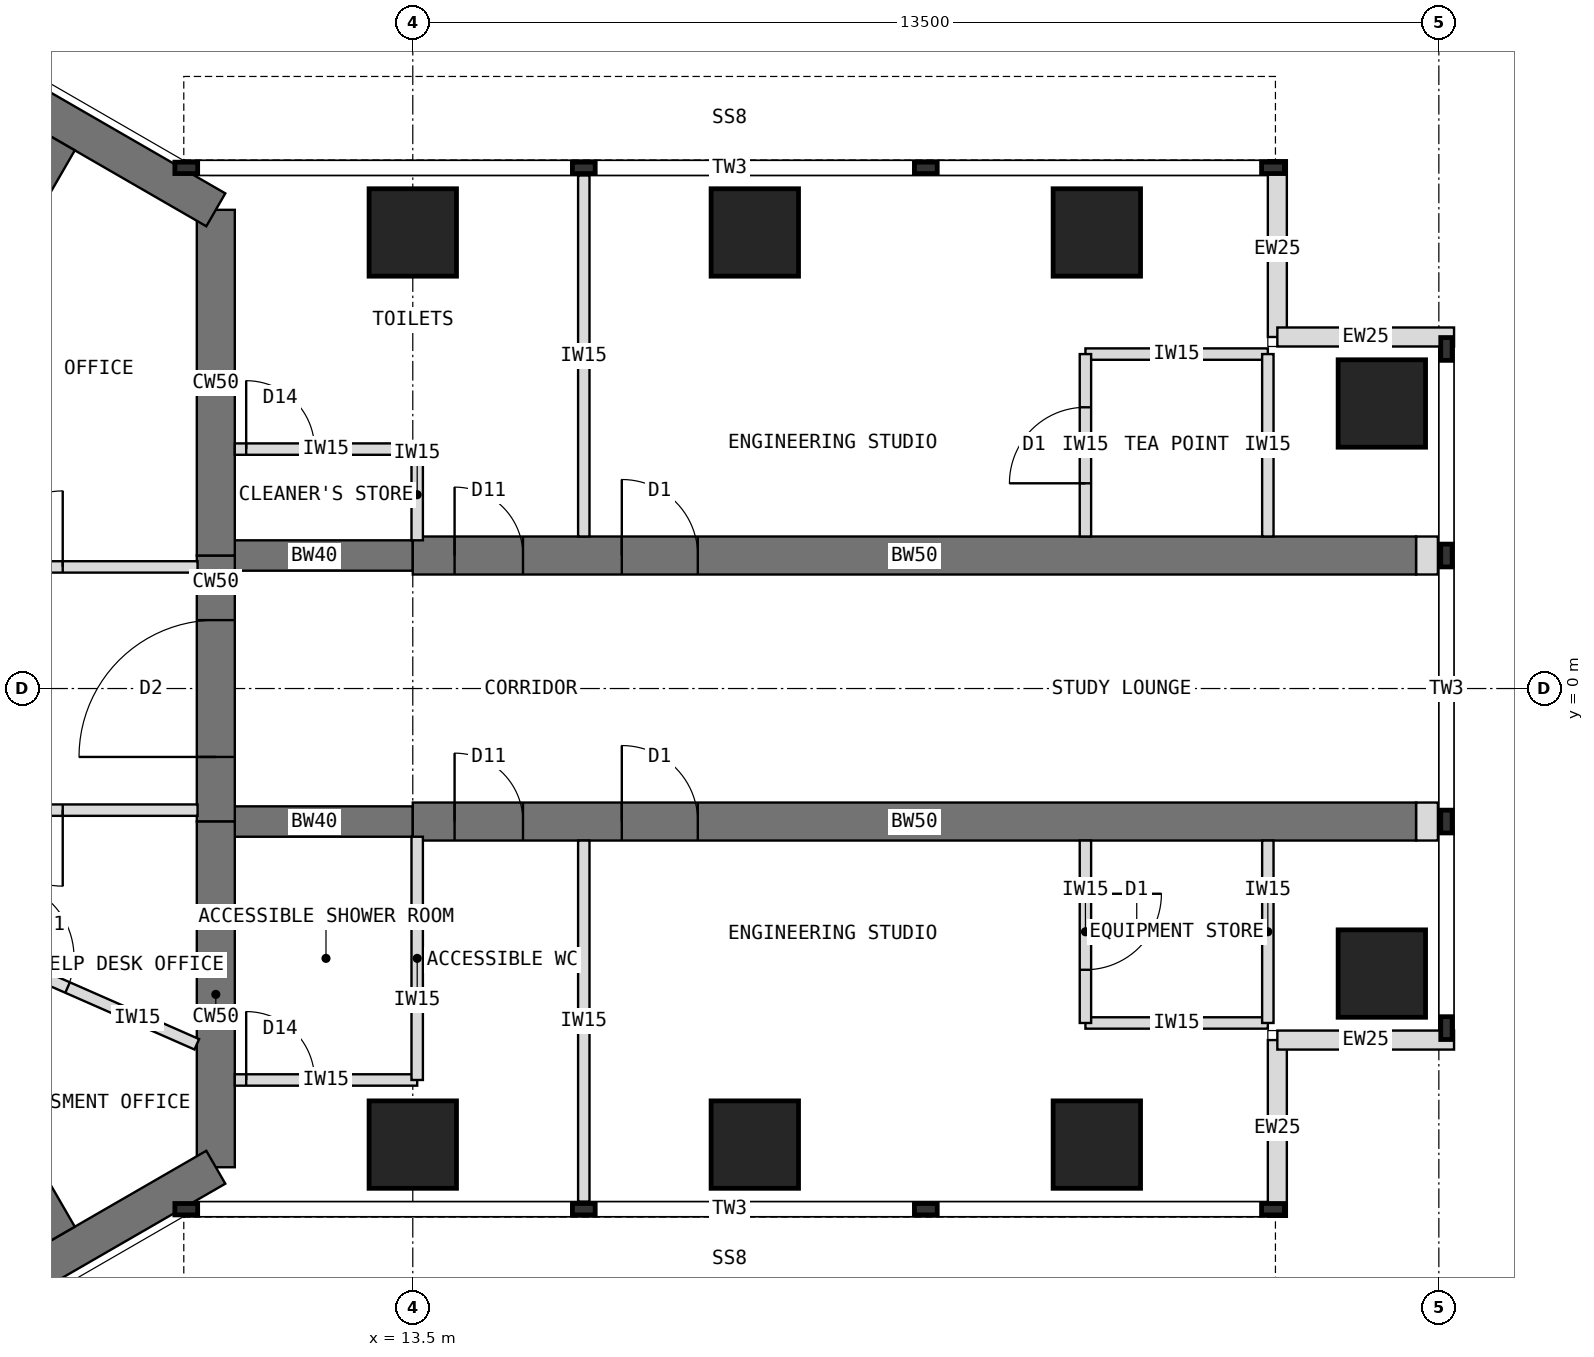
"""IFC4 building model, lengths in metres.
Left out: names, types, materials, properties, quantities, classifications, styles, units other than length and angle.
Written with IfcOpenShell. Run it as: python <this file> out.ifc"""

import sys

from ifc_helpers import new_model, si_unit, direction, frame, frame_2d, origin, origin_2d, place, context, subcontext, project, spatial, rectangle, extrude, element, fill, save


model = new_model("IFC4")
c1 = context("Model", 3, precision=1e-05, world=origin(), true_north=direction((0.0, 1.0)))
c2 = subcontext(c1, "Body", "Model", "MODEL_VIEW")
j1 = project(units=[si_unit("LENGTHUNIT", "METRE"), si_unit("PLANEANGLEUNIT", "RADIAN")], contexts=[c1])
p1 = place(None, origin())
s1 = spatial("IfcSite", under=j1, at=p1, CompositionType="ELEMENT")
p2 = place(p1, origin())
s2 = spatial("IfcBuilding", under=s1, at=p2, CompositionType="ELEMENT")
p3 = place(p2, frame((0.0, 0.0, 194.5)))
s3 = spatial("IfcBuildingStorey", under=s2, at=p3, CompositionType="ELEMENT", Elevation=194.5)
p4 = place(p3, frame((10.908, -6.298, 0.0), z_axis=(0.0, 0.0, 1.0), x_axis=(0.0, 1.0, 0.0)))
e1 = element("IfcWall", 1, at=p4, inside=s3, PredefinedType="SHEAR", context=c2, shape_type="SweptSolid", body=[
    extrude(rectangle(XDim=4.548, YDim=0.5, at=frame_2d((2.274, 0.0))), origin(), (0.0, 0.0, 1.0), 4.0),
])
p5 = place(p3, frame((10.908, -1.75, 0.0), z_axis=(0.0, 0.0, 1.0), x_axis=(0.0, 1.0, 0.0)))
e2 = element("IfcWall", 2, at=p5, inside=s3, PredefinedType="SHEAR", context=c2, shape_type="SweptSolid", body=[
    extrude(rectangle(XDim=3.5, YDim=0.5, at=frame_2d((1.75, 0.0))), origin(), (0.0, 0.0, 1.0), 4.0),
])
p6 = place(p5, frame((0.85, 0.0, 0.0)))
e3 = element("IfcOpeningElement", 3, at=p6, cuts=e2, PredefinedType="OPENING", context=c2, shape_type="SweptSolid", body=[
    extrude(rectangle(XDim=1.8, YDim=2.1, at=frame_2d((0.9, 1.05))), frame((0.0, 0.26, 0.0), z_axis=(0.0, -1.0, 0.0), x_axis=(1.0, 0.0, 0.0)), (0.0, 0.0, 1.0), 0.52),
])
p7 = place(p3, frame((10.908, 1.75, 0.0), z_axis=(0.0, 0.0, 1.0), x_axis=(0.0, 1.0, 0.0)))
e4 = element("IfcWall", 4, at=p7, inside=s3, PredefinedType="SHEAR", context=c2, shape_type="SweptSolid", body=[
    extrude(rectangle(XDim=4.548, YDim=0.5, at=frame_2d((2.274, 0.0))), origin(), (0.0, 0.0, 1.0), 4.0),
])
for number, where, z_axis, x_axis in (
    (5, (10.908, 6.298, 0.0), (0.0, 0.0, 1.0), (-0.866, 0.5, 0.0)),
    (6, (0.0, -12.596, 0.0), (0.0, 0.0, 1.0), (0.866, 0.5, 0.0)),
):
    element("IfcWall", number, at=place(p3, frame(where, z_axis=z_axis, x_axis=x_axis)), inside=s3, PredefinedType="SHEAR", context=c2, shape_type="SweptSolid", body=[
        extrude(rectangle(XDim=12.596, YDim=0.5, at=frame_2d((6.298, 0.0))), origin(), (0.0, 0.0, 1.0), 4.0),
    ])
p8 = place(p3, frame((10.908, 1.75, 0.0), z_axis=(0.0, 0.0, 1.0), x_axis=(1.0, 0.0, 0.0)))
e7 = element("IfcWall", 7, at=p8, inside=s3, PredefinedType="SHEAR", context=c2, shape_type="SweptSolid", body=[
    extrude(rectangle(XDim=2.592, YDim=0.4, at=frame_2d((1.296, 0.0))), origin(), (0.0, 0.0, 1.0), 4.0),
])
p9 = place(p3, frame((13.5, 1.75, 0.0), z_axis=(0.0, 0.0, 1.0), x_axis=(1.0, 0.0, 0.0)))
e8 = element("IfcWall", 8, at=p9, inside=s3, PredefinedType="SHEAR", context=c2, shape_type="SweptSolid", body=[
    extrude(rectangle(XDim=13.2, YDim=0.5, at=frame_2d((6.6, 0.0))), origin(), (0.0, 0.0, 1.0), 4.0),
])
p10 = place(p9, frame((0.55, 0.0, 0.0)))
e9 = element("IfcOpeningElement", 9, at=p10, cuts=e8, PredefinedType="OPENING", context=c2, shape_type="SweptSolid", body=[
    extrude(rectangle(XDim=0.9, YDim=2.1, at=frame_2d((0.45, 1.05))), frame((0.0, 0.26, 0.0), z_axis=(0.0, -1.0, 0.0), x_axis=(1.0, 0.0, 0.0)), (0.0, 0.0, 1.0), 0.52),
])
p11 = place(p9, frame((2.75, 0.0, 0.0)))
e10 = element("IfcOpeningElement", 10, at=p11, cuts=e8, PredefinedType="OPENING", context=c2, shape_type="SweptSolid", body=[
    extrude(rectangle(XDim=1.0, YDim=2.1, at=frame_2d((0.5, 1.05))), frame((0.0, 0.26, 0.0), z_axis=(0.0, -1.0, 0.0), x_axis=(1.0, 0.0, 0.0)), (0.0, 0.0, 1.0), 0.52),
])
p12 = place(p3, frame((10.908, -1.75, 0.0), z_axis=(0.0, 0.0, 1.0), x_axis=(1.0, 0.0, 0.0)))
e11 = element("IfcWall", 11, at=p12, inside=s3, PredefinedType="SHEAR", context=c2, shape_type="SweptSolid", body=[
    extrude(rectangle(XDim=2.592, YDim=0.4, at=frame_2d((1.296, 0.0))), origin(), (0.0, 0.0, 1.0), 4.0),
])
p13 = place(p3, frame((13.5, -1.75, 0.0), z_axis=(0.0, 0.0, 1.0), x_axis=(1.0, 0.0, 0.0)))
e12 = element("IfcWall", 12, at=p13, inside=s3, PredefinedType="SHEAR", context=c2, shape_type="SweptSolid", body=[
    extrude(rectangle(XDim=13.2, YDim=0.5, at=frame_2d((6.6, 0.0))), origin(), (0.0, 0.0, 1.0), 4.0),
])
p14 = place(p13, frame((0.55, 0.0, 0.0)))
e13 = element("IfcOpeningElement", 13, at=p14, cuts=e12, PredefinedType="OPENING", context=c2, shape_type="SweptSolid", body=[
    extrude(rectangle(XDim=0.9, YDim=2.1, at=frame_2d((0.45, 1.05))), frame((0.0, 0.26, 0.0), z_axis=(0.0, -1.0, 0.0), x_axis=(1.0, 0.0, 0.0)), (0.0, 0.0, 1.0), 0.52),
])
p15 = place(p13, frame((2.75, 0.0, 0.0)))
e14 = element("IfcOpeningElement", 14, at=p15, cuts=e12, PredefinedType="OPENING", context=c2, shape_type="SweptSolid", body=[
    extrude(rectangle(XDim=1.0, YDim=2.1, at=frame_2d((0.5, 1.05))), frame((0.0, 0.26, 0.0), z_axis=(0.0, -1.0, 0.0), x_axis=(1.0, 0.0, 0.0)), (0.0, 0.0, 1.0), 0.52),
])
for number, where, z_axis, x_axis in (
    (15, (13.5, 6.0, 0.0), (0.0, 0.0, 1.0), (1.0, 0.0, 0.0)),
    (16, (13.5, -6.0, 0.0), (0.0, 0.0, 1.0), (1.0, 0.0, 0.0)),
    (17, (18.0, 6.0, 0.0), (0.0, 0.0, 1.0), (1.0, 0.0, 0.0)),
    (18, (18.0, -6.0, 0.0), (0.0, 0.0, 1.0), (1.0, 0.0, 0.0)),
    (19, (22.5, 6.0, 0.0), (0.0, 0.0, 1.0), (1.0, 0.0, 0.0)),
    (20, (22.5, -6.0, 0.0), (0.0, 0.0, 1.0), (1.0, 0.0, 0.0)),
    (21, (26.25, 3.75, 0.0), (0.0, 0.0, 1.0), (1.0, 0.0, 0.0)),
    (22, (26.25, -3.75, 0.0), (0.0, 0.0, 1.0), (1.0, 0.0, 0.0)),
):
    element("IfcColumn", number, at=place(p3, frame(where, z_axis=z_axis, x_axis=x_axis)), inside=s3, PredefinedType="COLUMN", context=c2, shape_type="SweptSolid", body=[
        extrude(rectangle(XDim=1.15, YDim=1.15, at=origin_2d()), origin(), (0.0, 0.0, 1.0), 4.0),
    ])
for number, where, z_axis, x_axis in (
    (23, (24.875, 6.95, 0.0), (0.0, 0.0, 1.0), (0.0, -1.0, 0.0)),
    (24, (24.875, 4.625, 0.0), (0.0, 0.0, 1.0), (1.0, 0.0, 0.0)),
    (25, (24.875, -6.95, 0.0), (0.0, 0.0, 1.0), (0.0, 1.0, 0.0)),
    (26, (24.875, -4.625, 0.0), (0.0, 0.0, 1.0), (1.0, 0.0, 0.0)),
):
    element("IfcWall", number, at=place(p3, frame(where, z_axis=z_axis, x_axis=x_axis)), inside=s3, PredefinedType="STANDARD", context=c2, shape_type="SweptSolid", body=[
        extrude(rectangle(XDim=2.325, YDim=0.25, at=frame_2d((1.163, 0.0))), origin(), (0.0, 0.0, 1.0), 3.8),
    ])
for number, where, z_axis, x_axis in (
    (27, (26.7, 1.75, 0.0), (0.0, 0.0, 1.0), (1.0, 0.0, 0.0)),
    (28, (26.7, -1.75, 0.0), (0.0, 0.0, 1.0), (1.0, 0.0, 0.0)),
):
    element("IfcWall", number, at=place(p3, frame(where, z_axis=z_axis, x_axis=x_axis)), inside=s3, PredefinedType="PARTITIONING", context=c2, shape_type="SweptSolid", body=[
        extrude(rectangle(XDim=0.288, YDim=0.5, at=frame_2d((0.144, 0.0))), origin(), (0.0, 0.0, 1.0), 3.8),
    ])
for number, where, z_axis, x_axis in (
    (29, (5.901, 2.02, 0.0), (0.0, 0.0, 1.0), (0.5, 0.866, 0.0)),
    (30, (5.901, -2.02, 0.0), (0.0, 0.0, 1.0), (0.5, -0.866, 0.0)),
):
    element("IfcWall", number, at=place(p3, frame(where, z_axis=z_axis, x_axis=x_axis)), inside=s3, PredefinedType="SHEAR", context=c2, shape_type="SweptSolid", body=[
        extrude(rectangle(XDim=5.958, YDim=0.4, at=frame_2d((2.979, 0.0))), origin(), (0.0, 0.0, 1.0), 4.0),
    ])
p16 = place(p3, frame((15.75, 2.0, 0.0), z_axis=(0.0, 0.0, 1.0), x_axis=(0.0, 1.0, 0.0)))
e31 = element("IfcWall", 31, at=p16, inside=s3, PredefinedType="PARTITIONING", context=c2, shape_type="SweptSolid", body=[
    extrude(rectangle(XDim=4.75, YDim=0.15, at=frame_2d((2.375, 0.0))), origin(), (0.0, 0.0, 1.0), 3.8),
])
p17 = place(p3, frame((22.35, 4.4, 0.0), z_axis=(0.0, 0.0, 1.0), x_axis=(1.0, 0.0, 0.0)))
e32 = element("IfcWall", 32, at=p17, inside=s3, PredefinedType="PARTITIONING", context=c2, shape_type="SweptSolid", body=[
    extrude(rectangle(XDim=2.4, YDim=0.15, at=frame_2d((1.2, 0.0))), origin(), (0.0, 0.0, 1.0), 3.8),
])
p18 = place(p3, frame((22.35, 2.0, 0.0), z_axis=(0.0, 0.0, 1.0), x_axis=(0.0, 1.0, 0.0)))
e33 = element("IfcWall", 33, at=p18, inside=s3, PredefinedType="PARTITIONING", context=c2, shape_type="SweptSolid", body=[
    extrude(rectangle(XDim=2.4, YDim=0.15, at=frame_2d((1.2, 0.0))), origin(), (0.0, 0.0, 1.0), 3.8),
])
p19 = place(p18, frame((0.7, 0.0, 0.0)))
e34 = element("IfcOpeningElement", 34, at=p19, cuts=e33, PredefinedType="OPENING", context=c2, shape_type="SweptSolid", body=[
    extrude(rectangle(XDim=1.0, YDim=2.1, at=frame_2d((0.5, 1.05))), frame((0.0, 0.085, 0.0), z_axis=(0.0, -1.0, 0.0), x_axis=(1.0, 0.0, 0.0)), (0.0, 0.0, 1.0), 0.17),
])
p20 = place(p3, frame((24.75, 2.0, 0.0), z_axis=(0.0, 0.0, 1.0), x_axis=(0.0, 1.0, 0.0)))
e35 = element("IfcWall", 35, at=p20, inside=s3, PredefinedType="PARTITIONING", context=c2, shape_type="SweptSolid", body=[
    extrude(rectangle(XDim=2.4, YDim=0.15, at=frame_2d((1.2, 0.0))), origin(), (0.0, 0.0, 1.0), 3.8),
])
p21 = place(p3, frame((11.158, 3.15, 0.0), z_axis=(0.0, 0.0, 1.0), x_axis=(1.0, 0.0, 0.0)))
e36 = element("IfcWall", 36, at=p21, inside=s3, PredefinedType="PARTITIONING", context=c2, shape_type="SweptSolid", body=[
    extrude(rectangle(XDim=2.4, YDim=0.15, at=frame_2d((1.2, 0.0))), origin(), (0.0, 0.0, 1.0), 3.8),
])
p22 = place(p21, frame((0.15, 0.0, 0.0)))
e37 = element("IfcOpeningElement", 37, at=p22, cuts=e36, PredefinedType="OPENING", context=c2, shape_type="SweptSolid", body=[
    extrude(rectangle(XDim=0.9, YDim=2.1, at=frame_2d((0.45, 1.05))), frame((0.0, 0.085, 0.0), z_axis=(0.0, -1.0, 0.0), x_axis=(1.0, 0.0, 0.0)), (0.0, 0.0, 1.0), 0.17),
])
p23 = place(p3, frame((13.558, 1.95, 0.0), z_axis=(0.0, 0.0, 1.0), x_axis=(0.0, 1.0, 0.0)))
e38 = element("IfcWall", 38, at=p23, inside=s3, PredefinedType="PARTITIONING", context=c2, shape_type="SweptSolid", body=[
    extrude(rectangle(XDim=1.2, YDim=0.15, at=frame_2d((0.6, 0.0))), origin(), (0.0, 0.0, 1.0), 3.267),
])
p24 = place(p3, frame((15.75, -2.0, 0.0), z_axis=(0.0, 0.0, 1.0), x_axis=(0.0, -1.0, 0.0)))
e39 = element("IfcWall", 39, at=p24, inside=s3, PredefinedType="PARTITIONING", context=c2, shape_type="SweptSolid", body=[
    extrude(rectangle(XDim=4.75, YDim=0.15, at=frame_2d((2.375, 0.0))), origin(), (0.0, 0.0, 1.0), 3.8),
])
p25 = place(p3, frame((22.35, -4.4, 0.0), z_axis=(0.0, 0.0, 1.0), x_axis=(1.0, 0.0, 0.0)))
e40 = element("IfcWall", 40, at=p25, inside=s3, PredefinedType="PARTITIONING", context=c2, shape_type="SweptSolid", body=[
    extrude(rectangle(XDim=2.4, YDim=0.15, at=frame_2d((1.2, 0.0))), origin(), (0.0, 0.0, 1.0), 3.8),
])
p26 = place(p3, frame((22.35, -2.0, 0.0), z_axis=(0.0, 0.0, 1.0), x_axis=(0.0, -1.0, 0.0)))
e41 = element("IfcWall", 41, at=p26, inside=s3, PredefinedType="PARTITIONING", context=c2, shape_type="SweptSolid", body=[
    extrude(rectangle(XDim=2.4, YDim=0.15, at=frame_2d((1.2, 0.0))), origin(), (0.0, 0.0, 1.0), 3.8),
])
p27 = place(p26, frame((0.7, 0.0, 0.0)))
e42 = element("IfcOpeningElement", 42, at=p27, cuts=e41, PredefinedType="OPENING", context=c2, shape_type="SweptSolid", body=[
    extrude(rectangle(XDim=1.0, YDim=2.1, at=frame_2d((0.5, 1.05))), frame((0.0, 0.085, 0.0), z_axis=(0.0, -1.0, 0.0), x_axis=(1.0, 0.0, 0.0)), (0.0, 0.0, 1.0), 0.17),
])
p28 = place(p3, frame((24.75, -2.0, 0.0), z_axis=(0.0, 0.0, 1.0), x_axis=(0.0, -1.0, 0.0)))
e43 = element("IfcWall", 43, at=p28, inside=s3, PredefinedType="PARTITIONING", context=c2, shape_type="SweptSolid", body=[
    extrude(rectangle(XDim=2.4, YDim=0.15, at=frame_2d((1.2, 0.0))), origin(), (0.0, 0.0, 1.0), 3.8),
])
p29 = place(p3, frame((11.158, -5.15, 0.0), z_axis=(0.0, 0.0, 1.0), x_axis=(1.0, 0.0, 0.0)))
e44 = element("IfcWall", 44, at=p29, inside=s3, PredefinedType="PARTITIONING", context=c2, shape_type="SweptSolid", body=[
    extrude(rectangle(XDim=2.4, YDim=0.15, at=frame_2d((1.2, 0.0))), origin(), (0.0, 0.0, 1.0), 3.8),
])
p30 = place(p29, frame((0.15, 0.0, 0.0)))
e45 = element("IfcOpeningElement", 45, at=p30, cuts=e44, PredefinedType="OPENING", context=c2, shape_type="SweptSolid", body=[
    extrude(rectangle(XDim=0.9, YDim=2.1, at=frame_2d((0.45, 1.05))), frame((0.0, 0.085, 0.0), z_axis=(0.0, -1.0, 0.0), x_axis=(1.0, 0.0, 0.0)), (0.0, 0.0, 1.0), 0.17),
])
p31 = place(p3, frame((13.558, -1.95, 0.0), z_axis=(0.0, 0.0, 1.0), x_axis=(0.0, -1.0, 0.0)))
e46 = element("IfcWall", 46, at=p31, inside=s3, PredefinedType="PARTITIONING", context=c2, shape_type="SweptSolid", body=[
    extrude(rectangle(XDim=3.2, YDim=0.15, at=frame_2d((1.6, 0.0))), origin(), (0.0, 0.0, 1.0), 3.267),
])
p32 = place(p3, frame((6.1, 1.6, 0.0), z_axis=(0.0, 0.0, 1.0), x_axis=(1.0, 0.0, 0.0)))
e47 = element("IfcWall", 47, at=p32, inside=s3, PredefinedType="PARTITIONING", context=c2, shape_type="SweptSolid", body=[
    extrude(rectangle(XDim=4.568, YDim=0.15, at=frame_2d((2.284, 0.0))), origin(), (0.0, 0.0, 1.0), 3.8),
])
p33 = place(p32, frame((1.794, 0.0, 0.0)))
e48 = element("IfcOpeningElement", 48, at=p33, cuts=e47, PredefinedType="OPENING", context=c2, shape_type="SweptSolid", body=[
    extrude(rectangle(XDim=1.0, YDim=2.1, at=frame_2d((0.5, 1.05))), frame((0.0, 0.085, 0.0), z_axis=(0.0, -1.0, 0.0), x_axis=(1.0, 0.0, 0.0)), (0.0, 0.0, 1.0), 0.17),
])
p34 = place(p3, frame((10.668, -1.6, 0.0), z_axis=(0.0, 0.0, 1.0), x_axis=(-1.0, 0.0, 0.0)))
e49 = element("IfcWall", 49, at=p34, inside=s3, PredefinedType="PARTITIONING", context=c2, shape_type="SweptSolid", body=[
    extrude(rectangle(XDim=4.568, YDim=0.15, at=frame_2d((2.284, 0.0))), origin(), (0.0, 0.0, 1.0), 3.8),
])
p35 = place(p34, frame((1.774, 0.0, 0.0)))
e50 = element("IfcOpeningElement", 50, at=p35, cuts=e49, PredefinedType="OPENING", context=c2, shape_type="SweptSolid", body=[
    extrude(rectangle(XDim=1.0, YDim=2.1, at=frame_2d((0.5, 1.05))), frame((0.0, 0.085, 0.0), z_axis=(0.0, -1.0, 0.0), x_axis=(1.0, 0.0, 0.0)), (0.0, 0.0, 1.0), 0.17),
])
p36 = place(p3, frame((6.342, -2.785, 0.0), z_axis=(0.0, 0.0, 1.0), x_axis=(0.915607292951, -0.402073730919, 0.0)))
e51 = element("IfcWall", 51, at=p36, inside=s3, PredefinedType="PARTITIONING", context=c2, shape_type="SweptSolid", body=[
    extrude(rectangle(XDim=4.714, YDim=0.15, at=frame_2d((2.357, 0.0))), origin(), (0.0, 0.0, 1.0), 3.8),
])
p37 = place(p36, frame((1.857, 0.0, 0.0)))
e52 = element("IfcOpeningElement", 52, at=p37, cuts=e51, PredefinedType="OPENING", context=c2, shape_type="SweptSolid", body=[
    extrude(rectangle(XDim=1.0, YDim=2.1, at=frame_2d((0.5, 1.05))), frame((0.0, 0.085, 0.0), z_axis=(0.0, -1.0, 0.0), x_axis=(1.0, 0.0, 0.0)), (0.0, 0.0, 1.0), 0.17),
])
p38 = place(p6, origin())
e53 = element("IfcDoor", 53, at=p38, inside=s3, OperationType="DOUBLE_DOOR_DOUBLE_SWING", PredefinedType="DOOR", context=c2, shape_type="SweptSolid", body=[
    extrude(rectangle(XDim=1.8, YDim=2.1, at=frame_2d((0.9, 1.05))), frame((0.0, 0.025, 0.0), z_axis=(0.0, -1.0, 0.0), x_axis=(1.0, 0.0, 0.0)), (0.0, 0.0, 1.0), 0.05),
])
fill(e3, e53)
p39 = place(p19, origin())
e54 = element("IfcDoor", 54, at=p39, inside=s3, OperationType="SINGLE_SWING_LEFT", PredefinedType="DOOR", context=c2, shape_type="SweptSolid", body=[
    extrude(rectangle(XDim=1.0, YDim=2.1, at=frame_2d((0.5, 1.05))), frame((0.0, 0.025, 0.0), z_axis=(0.0, -1.0, 0.0), x_axis=(1.0, 0.0, 0.0)), (0.0, 0.0, 1.0), 0.05),
])
fill(e34, e54)
p40 = place(p22, origin())
e55 = element("IfcDoor", 55, at=p40, inside=s3, OperationType="SINGLE_SWING_LEFT", PredefinedType="DOOR", context=c2, shape_type="SweptSolid", body=[
    extrude(rectangle(XDim=0.9, YDim=2.1, at=frame_2d((0.45, 1.05))), frame((0.0, 0.025, 0.0), z_axis=(0.0, -1.0, 0.0), x_axis=(1.0, 0.0, 0.0)), (0.0, 0.0, 1.0), 0.05),
])
fill(e37, e55)
p41 = place(p27, origin())
e56 = element("IfcDoor", 56, at=p41, inside=s3, OperationType="SINGLE_SWING_LEFT", PredefinedType="DOOR", context=c2, shape_type="SweptSolid", body=[
    extrude(rectangle(XDim=1.0, YDim=2.1, at=frame_2d((0.5, 1.05))), frame((0.0, 0.025, 0.0), z_axis=(0.0, -1.0, 0.0), x_axis=(1.0, 0.0, 0.0)), (0.0, 0.0, 1.0), 0.05),
])
fill(e42, e56)
p42 = place(p30, origin())
e57 = element("IfcDoor", 57, at=p42, inside=s3, OperationType="SINGLE_SWING_LEFT", PredefinedType="DOOR", context=c2, shape_type="SweptSolid", body=[
    extrude(rectangle(XDim=0.9, YDim=2.1, at=frame_2d((0.45, 1.05))), frame((0.0, 0.025, 0.0), z_axis=(0.0, -1.0, 0.0), x_axis=(1.0, 0.0, 0.0)), (0.0, 0.0, 1.0), 0.05),
])
fill(e45, e57)
p43 = place(p35, origin())
e58 = element("IfcDoor", 58, at=p43, inside=s3, OperationType="SINGLE_SWING_LEFT", PredefinedType="DOOR", context=c2, shape_type="SweptSolid", body=[
    extrude(rectangle(XDim=1.0, YDim=2.1, at=frame_2d((0.5, 1.05))), frame((0.0, 0.025, 0.0), z_axis=(0.0, -1.0, 0.0), x_axis=(1.0, 0.0, 0.0)), (0.0, 0.0, 1.0), 0.05),
])
fill(e50, e58)
p44 = place(p37, origin())
e59 = element("IfcDoor", 59, at=p44, inside=s3, OperationType="SINGLE_SWING_LEFT", PredefinedType="DOOR", context=c2, shape_type="SweptSolid", body=[
    extrude(rectangle(XDim=1.0, YDim=2.1, at=frame_2d((0.5, 1.05))), frame((0.0, 0.025, 0.0), z_axis=(0.0, -1.0, 0.0), x_axis=(1.0, 0.0, 0.0)), (0.0, 0.0, 1.0), 0.05),
])
fill(e52, e59)
p45 = place(p33, origin())
e60 = element("IfcDoor", 60, at=p45, inside=s3, OperationType="SINGLE_SWING_RIGHT", PredefinedType="DOOR", context=c2, shape_type="SweptSolid", body=[
    extrude(rectangle(XDim=1.0, YDim=2.1, at=frame_2d((0.5, 1.05))), frame((0.0, 0.025, 0.0), z_axis=(0.0, -1.0, 0.0), x_axis=(1.0, 0.0, 0.0)), (0.0, 0.0, 1.0), 0.05),
])
fill(e48, e60)
p46 = place(p10, origin())
e61 = element("IfcDoor", 61, at=p46, inside=s3, OperationType="SINGLE_SWING_LEFT", PredefinedType="DOOR", context=c2, shape_type="SweptSolid", body=[
    extrude(rectangle(XDim=0.9, YDim=2.1, at=frame_2d((0.45, 1.05))), frame((0.0, 0.025, 0.0), z_axis=(0.0, -1.0, 0.0), x_axis=(1.0, 0.0, 0.0)), (0.0, 0.0, 1.0), 0.05),
])
fill(e9, e61)
p47 = place(p11, origin())
e62 = element("IfcDoor", 62, at=p47, inside=s3, OperationType="SINGLE_SWING_LEFT", PredefinedType="DOOR", context=c2, shape_type="SweptSolid", body=[
    extrude(rectangle(XDim=1.0, YDim=2.1, at=frame_2d((0.5, 1.05))), frame((0.0, 0.025, 0.0), z_axis=(0.0, -1.0, 0.0), x_axis=(1.0, 0.0, 0.0)), (0.0, 0.0, 1.0), 0.05),
])
fill(e10, e62)
p48 = place(p14, origin())
e63 = element("IfcDoor", 63, at=p48, inside=s3, OperationType="SINGLE_SWING_LEFT", PredefinedType="DOOR", context=c2, shape_type="SweptSolid", body=[
    extrude(rectangle(XDim=0.9, YDim=2.1, at=frame_2d((0.45, 1.05))), frame((0.0, 0.025, 0.0), z_axis=(0.0, -1.0, 0.0), x_axis=(1.0, 0.0, 0.0)), (0.0, 0.0, 1.0), 0.05),
])
fill(e13, e63)
p49 = place(p15, origin())
e64 = element("IfcDoor", 64, at=p49, inside=s3, OperationType="SINGLE_SWING_LEFT", PredefinedType="DOOR", context=c2, shape_type="SweptSolid", body=[
    extrude(rectangle(XDim=1.0, YDim=2.1, at=frame_2d((0.5, 1.05))), frame((0.0, 0.025, 0.0), z_axis=(0.0, -1.0, 0.0), x_axis=(1.0, 0.0, 0.0)), (0.0, 0.0, 1.0), 0.05),
])
fill(e14, e64)
save(model, sys.argv[1])
